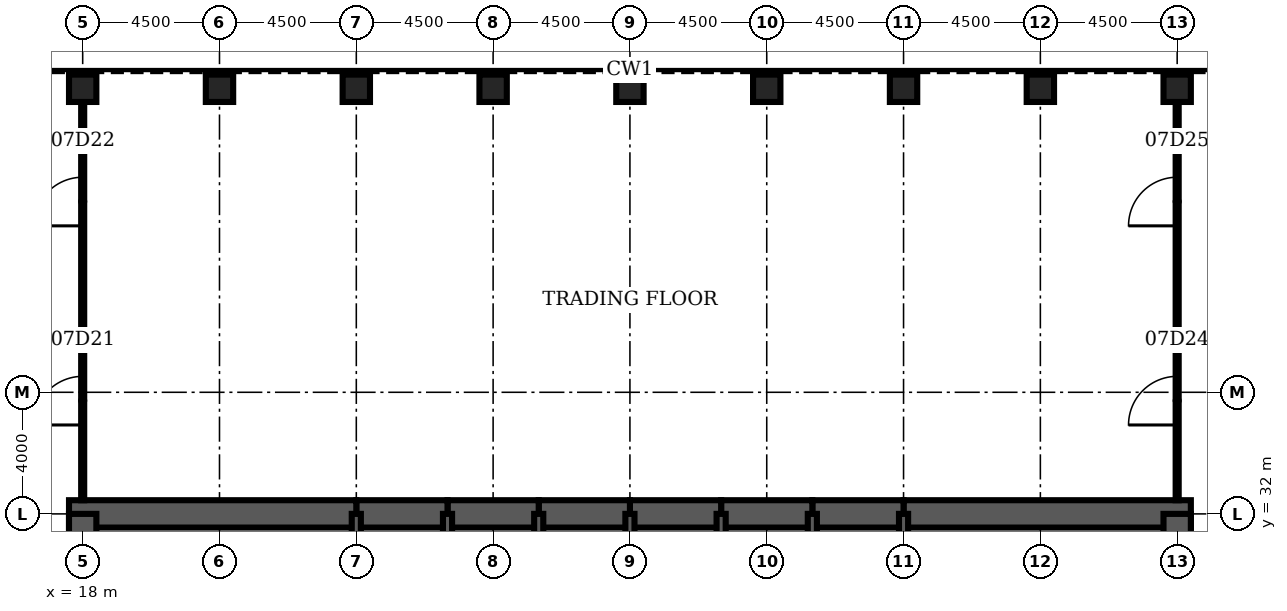
"""IFC4 building model, lengths in metres.
Left out: names, types, materials, properties, quantities, classifications, styles, units other than length and angle.
Written with IfcOpenShell. Run it as: python <this file> out.ifc"""

import sys

from ifc_helpers import new_model, si_unit, direction, frame, frame_2d, origin, origin_2d, place, context, subcontext, project, spatial, rectangle, hollow_rectangle, extrude, element, fill, save


model = new_model("IFC4")
c1 = context("Model", 3, precision=1e-05, world=origin(), true_north=direction((0.0, 1.0)))
c2 = subcontext(c1, "Body", "Model", "MODEL_VIEW")
j1 = project(units=[si_unit("LENGTHUNIT", "METRE"), si_unit("PLANEANGLEUNIT", "RADIAN")], contexts=[c1])
p1 = place(None, origin())
s1 = spatial("IfcSite", under=j1, at=p1, CompositionType="ELEMENT")
p2 = place(p1, origin())
s2 = spatial("IfcBuilding", under=s1, at=p2, CompositionType="ELEMENT")
p3 = place(p2, frame((0.0, 0.0, 36.5)))
s3 = spatial("IfcBuildingStorey", under=s2, at=p3, CompositionType="ELEMENT", Elevation=36.5)
for number, where, z_axis, x_axis in (
    (1, (54.0, 46.0, 0.0), (0.0, 0.0, 1.0), (0.0, 1.0, 0.0)),
    (2, (49.5, 46.0, 0.0), (0.0, 0.0, 1.0), (0.0, 1.0, 0.0)),
    (3, (45.0, 46.0, 0.0), (0.0, 0.0, 1.0), (0.0, 1.0, 0.0)),
    (4, (40.5, 46.0, 0.0), (0.0, 0.0, 1.0), (0.0, 1.0, 0.0)),
    (5, (36.0, 46.0, 0.0), (0.0, 0.0, 1.0), (0.0, 1.0, 0.0)),
    (6, (31.5, 46.0, 0.0), (0.0, 0.0, 1.0), (0.0, 1.0, 0.0)),
    (7, (27.0, 46.0, 0.0), (0.0, 0.0, 1.0), (0.0, 1.0, 0.0)),
    (8, (22.5, 46.0, 0.0), (0.0, 0.0, 1.0), (0.0, 1.0, 0.0)),
    (9, (18.0, 46.0, 0.0), (0.0, 0.0, 1.0), (0.0, 1.0, 0.0)),
):
    element("IfcColumn", number, at=place(p3, frame(where, z_axis=z_axis, x_axis=x_axis)), inside=s3, PredefinedType="COLUMN", context=c2, shape_type="SweptSolid", body=[
        extrude(hollow_rectangle(XDim=0.9, YDim=0.9, WallThickness=0.12, at=origin_2d()), origin(), (0.0, 0.0, 1.0), 4.5),
    ])
p4 = place(p3, frame((54.45, 32.0, 0.0), z_axis=(0.0, 0.0, 1.0), x_axis=(-1.0, 0.0, 0.0)))
e10 = element("IfcWall", 10, at=p4, inside=s3, PredefinedType="SHEAR", context=c2, shape_type="SweptSolid", body=[
    extrude(rectangle(XDim=9.45, YDim=0.9, at=frame_2d((4.725, 0.0))), origin(), (0.0, 0.0, 1.0), 4.5),
])
for number, where, z_axis, x_axis in (
    (11, (45.0, 32.0, 0.0), (0.0, 0.0, 1.0), (-1.0, 0.0, 0.0)),
    (12, (42.0, 32.0, 0.0), (0.0, 0.0, 1.0), (-1.0, 0.0, 0.0)),
    (13, (39.0, 32.0, 0.0), (0.0, 0.0, 1.0), (-1.0, 0.0, 0.0)),
    (14, (36.0, 32.0, 0.0), (0.0, 0.0, 1.0), (-1.0, 0.0, 0.0)),
    (15, (33.0, 32.0, 0.0), (0.0, 0.0, 1.0), (-1.0, 0.0, 0.0)),
    (16, (30.0, 32.0, 0.0), (0.0, 0.0, 1.0), (-1.0, 0.0, 0.0)),
):
    element("IfcWall", number, at=place(p3, frame(where, z_axis=z_axis, x_axis=x_axis)), inside=s3, PredefinedType="SHEAR", context=c2, shape_type="SweptSolid", body=[
        extrude(rectangle(XDim=3.0, YDim=0.9, at=frame_2d((1.5, 0.0))), origin(), (0.0, 0.0, 1.0), 4.5),
    ])
p5 = place(p3, frame((27.0, 32.0, 0.0), z_axis=(0.0, 0.0, 1.0), x_axis=(-1.0, 0.0, 0.0)))
e17 = element("IfcWall", 17, at=p5, inside=s3, PredefinedType="SHEAR", context=c2, shape_type="SweptSolid", body=[
    extrude(rectangle(XDim=9.45, YDim=0.9, at=frame_2d((4.725, 0.0))), origin(), (0.0, 0.0, 1.0), 4.5),
])
for number, where, z_axis, x_axis in (
    (18, (18.0, 32.0, 0.0), (0.0, 0.0, 1.0), (0.0, -1.0, 0.0)),
    (19, (54.0, 28.8, 0.0), (0.0, 0.0, 1.0), (0.0, 1.0, 0.0)),
):
    element("IfcWall", number, at=place(p3, frame(where, z_axis=z_axis, x_axis=x_axis)), inside=s3, PredefinedType="SHEAR", context=c2, shape_type="SweptSolid", body=[
        extrude(rectangle(XDim=3.2, YDim=0.9, at=frame_2d((1.6, 0.0))), origin(), (0.0, 0.0, 1.0), 4.5),
    ])
for number, where, z_axis, x_axis in (
    (20, (27.0, 28.8, 0.0), (0.0, 0.0, 1.0), (0.0, 1.0, 0.0)),
    (21, (30.0, 28.8, 0.0), (0.0, 0.0, 1.0), (0.0, 1.0, 0.0)),
    (22, (33.0, 28.8, 0.0), (0.0, 0.0, 1.0), (0.0, 1.0, 0.0)),
    (23, (36.0, 28.8, 0.0), (0.0, 0.0, 1.0), (0.0, 1.0, 0.0)),
    (24, (39.0, 28.8, 0.0), (0.0, 0.0, 1.0), (0.0, 1.0, 0.0)),
    (25, (42.0, 28.8, 0.0), (0.0, 0.0, 1.0), (0.0, 1.0, 0.0)),
    (26, (45.0, 28.8, 0.0), (0.0, 0.0, 1.0), (0.0, 1.0, 0.0)),
):
    element("IfcWall", number, at=place(p3, frame(where, z_axis=z_axis, x_axis=x_axis)), inside=s3, PredefinedType="SOLIDWALL", context=c2, shape_type="SweptSolid", body=[
        extrude(rectangle(XDim=3.2, YDim=0.3, at=frame_2d((1.6, 0.0))), origin(), (0.0, 0.0, 1.0), 4.5),
    ])
p6 = place(p3, frame((18.0, 32.45, 0.0), z_axis=(0.0, 0.0, 1.0), x_axis=(0.0, 1.0, 0.0)))
e27 = element("IfcWall", 27, at=p6, inside=s3, PredefinedType="PARTITIONING", context=c2, shape_type="SweptSolid", body=[
    extrude(rectangle(XDim=13.1, YDim=0.1, at=frame_2d((6.55, 0.0))), origin(), (0.0, 0.0, 1.0), 3.0),
])
p7 = place(p6, frame((2.475, 0.0, 0.0)))
e28 = element("IfcOpeningElement", 28, at=p7, cuts=e27, PredefinedType="OPENING", context=c2, shape_type="SweptSolid", body=[
    extrude(rectangle(XDim=1.6, YDim=2.1, at=frame_2d((0.8, 1.05))), frame((0.0, 0.06, 0.0), z_axis=(0.0, -1.0, 0.0), x_axis=(1.0, 0.0, 0.0)), (0.0, 0.0, 1.0), 0.12),
])
p8 = place(p6, frame((9.025, 0.0, 0.0)))
e29 = element("IfcOpeningElement", 29, at=p8, cuts=e27, PredefinedType="OPENING", context=c2, shape_type="SweptSolid", body=[
    extrude(rectangle(XDim=1.6, YDim=2.1, at=frame_2d((0.8, 1.05))), frame((0.0, 0.06, 0.0), z_axis=(0.0, -1.0, 0.0), x_axis=(1.0, 0.0, 0.0)), (0.0, 0.0, 1.0), 0.12),
])
p9 = place(p3, frame((54.0, 32.45, 0.0), z_axis=(0.0, 0.0, 1.0), x_axis=(0.0, 1.0, 0.0)))
e30 = element("IfcWall", 30, at=p9, inside=s3, PredefinedType="PARTITIONING", context=c2, shape_type="SweptSolid", body=[
    extrude(rectangle(XDim=13.1, YDim=0.1, at=frame_2d((6.55, 0.0))), origin(), (0.0, 0.0, 1.0), 3.0),
])
p10 = place(p9, frame((2.475, 0.0, 0.0)))
e31 = element("IfcOpeningElement", 31, at=p10, cuts=e30, PredefinedType="OPENING", context=c2, shape_type="SweptSolid", body=[
    extrude(rectangle(XDim=1.6, YDim=2.1, at=frame_2d((0.8, 1.05))), frame((0.0, 0.06, 0.0), z_axis=(0.0, -1.0, 0.0), x_axis=(1.0, 0.0, 0.0)), (0.0, 0.0, 1.0), 0.12),
])
p11 = place(p9, frame((9.025, 0.0, 0.0)))
e32 = element("IfcOpeningElement", 32, at=p11, cuts=e30, PredefinedType="OPENING", context=c2, shape_type="SweptSolid", body=[
    extrude(rectangle(XDim=1.6, YDim=2.1, at=frame_2d((0.8, 1.05))), frame((0.0, 0.06, 0.0), z_axis=(0.0, -1.0, 0.0), x_axis=(1.0, 0.0, 0.0)), (0.0, 0.0, 1.0), 0.12),
])
p12 = place(p7, origin())
e33 = element("IfcDoor", 33, at=p12, inside=s3, OperationType="SINGLE_SWING_LEFT", PredefinedType="DOOR", context=c2, shape_type="SweptSolid", body=[
    extrude(rectangle(XDim=1.6, YDim=2.1, at=frame_2d((0.8, 1.05))), frame((0.0, 0.025, 0.0), z_axis=(0.0, -1.0, 0.0), x_axis=(1.0, 0.0, 0.0)), (0.0, 0.0, 1.0), 0.05),
])
fill(e28, e33)
p13 = place(p8, origin())
e34 = element("IfcDoor", 34, at=p13, inside=s3, OperationType="SINGLE_SWING_LEFT", PredefinedType="DOOR", context=c2, shape_type="SweptSolid", body=[
    extrude(rectangle(XDim=1.6, YDim=2.1, at=frame_2d((0.8, 1.05))), frame((0.0, 0.025, 0.0), z_axis=(0.0, -1.0, 0.0), x_axis=(1.0, 0.0, 0.0)), (0.0, 0.0, 1.0), 0.05),
])
fill(e29, e34)
p14 = place(p10, origin())
e35 = element("IfcDoor", 35, at=p14, inside=s3, OperationType="SINGLE_SWING_LEFT", PredefinedType="DOOR", context=c2, shape_type="SweptSolid", body=[
    extrude(rectangle(XDim=1.6, YDim=2.1, at=frame_2d((0.8, 1.05))), frame((0.0, 0.025, 0.0), z_axis=(0.0, -1.0, 0.0), x_axis=(1.0, 0.0, 0.0)), (0.0, 0.0, 1.0), 0.05),
])
fill(e31, e35)
p15 = place(p11, origin())
e36 = element("IfcDoor", 36, at=p15, inside=s3, OperationType="SINGLE_SWING_LEFT", PredefinedType="DOOR", context=c2, shape_type="SweptSolid", body=[
    extrude(rectangle(XDim=1.6, YDim=2.1, at=frame_2d((0.8, 1.05))), frame((0.0, 0.025, 0.0), z_axis=(0.0, -1.0, 0.0), x_axis=(1.0, 0.0, 0.0)), (0.0, 0.0, 1.0), 0.05),
])
fill(e32, e36)
save(model, sys.argv[1])
